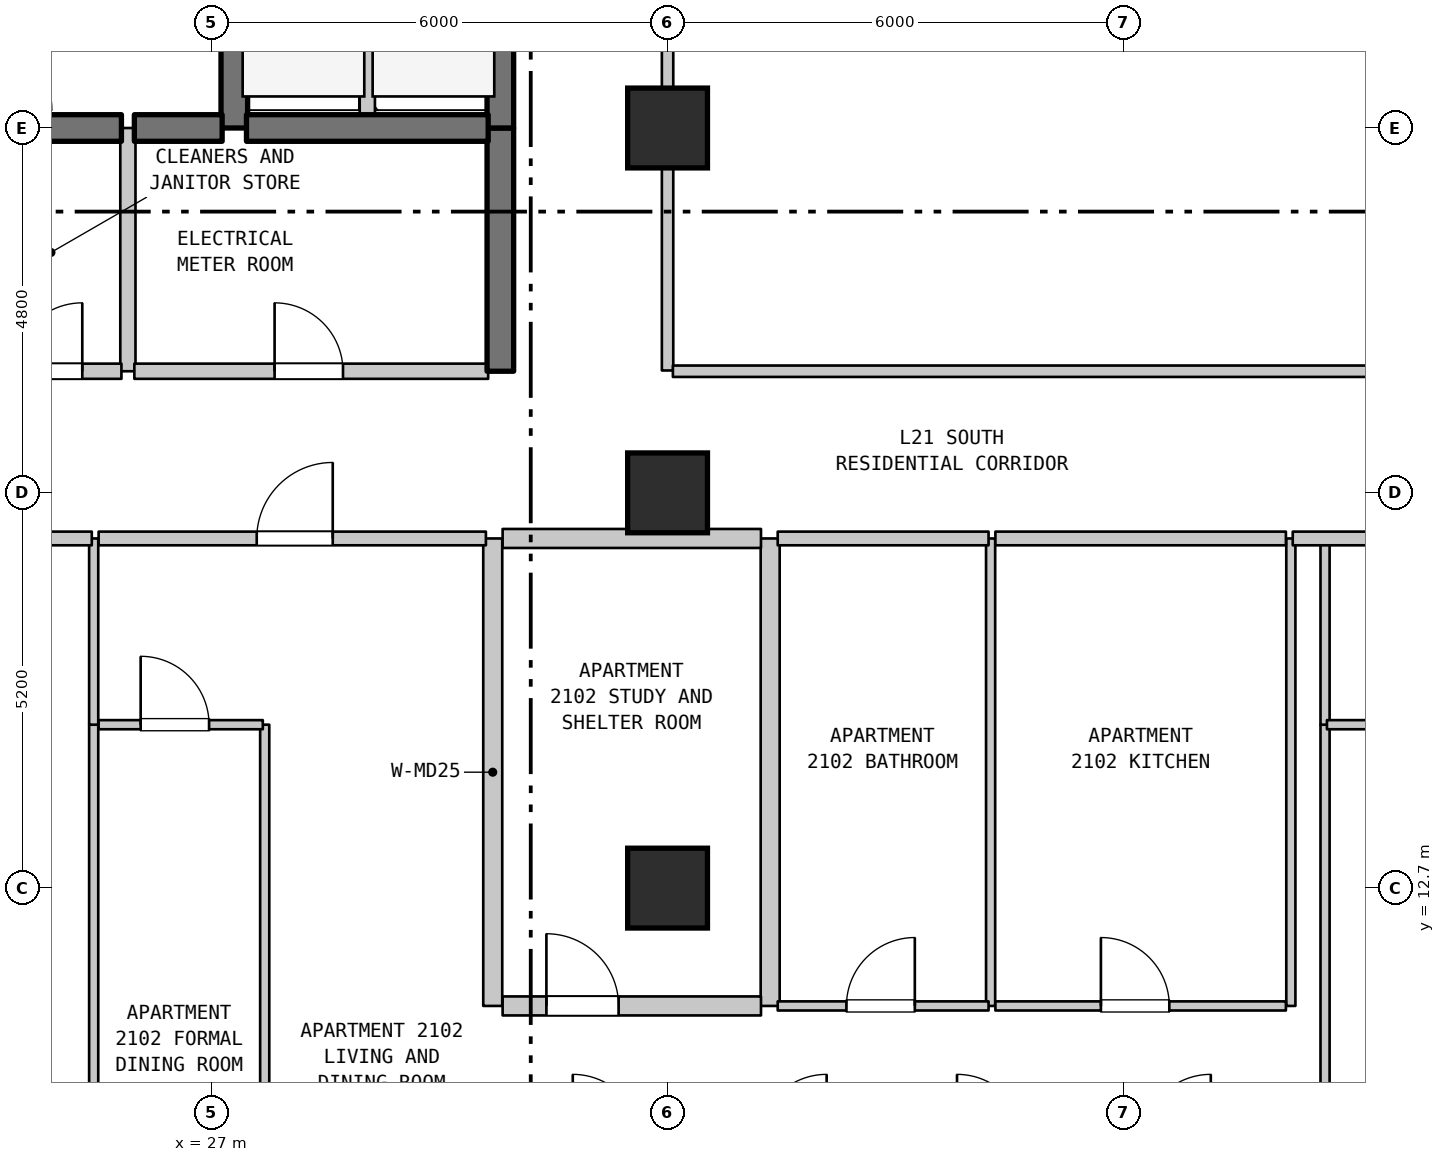
"""IFC4 building model, lengths in metres.
Left out: names, types, materials, properties, quantities, classifications, styles, units other than length and angle.
Written with IfcOpenShell. Run it as: python <this file> out.ifc"""

import sys

from ifc_helpers import new_model, si_unit, direction, frame, frame_2d, origin, origin_2d, place, context, subcontext, project, spatial, rectangle, extrude, element, fill, save


model = new_model("IFC4")
c1 = context("Model", 3, precision=1e-05, world=origin(), true_north=direction((0.0, 1.0)))
c2 = subcontext(c1, "Body", "Model", "MODEL_VIEW")
j1 = project(units=[si_unit("LENGTHUNIT", "METRE"), si_unit("PLANEANGLEUNIT", "RADIAN")], contexts=[c1])
p1 = place(None, origin())
s1 = spatial("IfcSite", under=j1, at=p1, CompositionType="ELEMENT")
p2 = place(p1, origin())
s2 = spatial("IfcBuilding", under=s1, at=p2, CompositionType="ELEMENT")
p3 = place(p2, frame((0.0, 0.0, 90.9)))
s3 = spatial("IfcBuildingStorey", under=s2, at=p3, CompositionType="ELEMENT", Elevation=90.9)
for number, where, z_axis, x_axis in (
    (1, (33.0, 12.7, 0.0), (0.0, 0.0, 1.0), (1.0, 0.0, 0.0)),
    (2, (33.0, 17.9, 0.0), (0.0, 0.0, 1.0), (1.0, 0.0, 0.0)),
    (3, (33.0, 22.7, 0.0), (0.0, 0.0, 1.0), (1.0, 0.0, 0.0)),
):
    element("IfcColumn", number, at=place(p3, frame(where, z_axis=z_axis, x_axis=x_axis)), inside=s3, PredefinedType="COLUMN", context=c2, shape_type="SweptSolid", body=[
        extrude(rectangle(XDim=1.05, YDim=1.05, at=origin_2d()), origin(), (0.0, 0.0, 1.0), 3.7),
    ])
p4 = place(p3, frame((25.45, 0.71, 0.0), z_axis=(0.0, 0.0, 1.0), x_axis=(0.0, 1.0, 0.0)))
e4 = element("IfcWall", 4, at=p4, inside=s3, PredefinedType="PARTITIONING", context=c2, shape_type="SweptSolid", body=[
    extrude(rectangle(XDim=14.14, YDim=0.12, at=frame_2d((7.07, 0.0))), origin(), (0.0, 0.0, 1.0), 3.385),
])
p5 = place(p3, frame((25.45, 14.85, 0.0), z_axis=(0.0, 0.0, 1.0), x_axis=(0.0, 1.0, 0.0)))
e5 = element("IfcWall", 5, at=p5, inside=s3, PredefinedType="PARTITIONING", context=c2, shape_type="SweptSolid", body=[
    extrude(rectangle(XDim=2.45, YDim=0.12, at=frame_2d((1.225, 0.0))), origin(), (0.0, 0.0, 1.0), 3.385),
])
p6 = place(p3, frame((25.9, 19.5, 0.0), z_axis=(0.0, 0.0, 1.0), x_axis=(0.0, 1.0, 0.0)))
e6 = element("IfcWall", 6, at=p6, inside=s3, PredefinedType="STANDARD", context=c2, shape_type="SweptSolid", body=[
    extrude(rectangle(XDim=3.2, YDim=0.2, at=frame_2d((1.6, 0.0))), origin(), (0.0, 0.0, 1.0), 3.385),
])
p7 = place(p3, frame((27.3, 22.7, 0.0), z_axis=(0.0, 0.0, 1.0), x_axis=(0.0, 1.0, 0.0)))
e7 = element("IfcWall", 7, at=p7, inside=s3, PredefinedType="SHEAR", context=c2, shape_type="SweptSolid", body=[
    extrude(rectangle(XDim=2.9, YDim=0.35, at=frame_2d((1.45, 0.0))), origin(), (0.0, 0.0, 1.0), 3.385),
])
p8 = place(p3, frame((27.7, 0.71, 0.0), z_axis=(0.0, 0.0, 1.0), x_axis=(0.0, 1.0, 0.0)))
e8 = element("IfcWall", 8, at=p8, inside=s3, PredefinedType="PARTITIONING", context=c2, shape_type="SweptSolid", body=[
    extrude(rectangle(XDim=14.14, YDim=0.12, at=frame_2d((7.07, 0.0))), origin(), (0.0, 0.0, 1.0), 3.385),
])
p9 = place(p3, frame((29.05, 22.7, 0.0), z_axis=(0.0, 0.0, 1.0), x_axis=(0.0, 1.0, 0.0)))
e9 = element("IfcWall", 9, at=p9, inside=s3, PredefinedType="STANDARD", context=c2, shape_type="SweptSolid", body=[
    extrude(rectangle(XDim=2.9, YDim=0.2, at=frame_2d((1.45, 0.0))), origin(), (0.0, 0.0, 1.0), 3.385),
])
p10 = place(p3, frame((30.7, 11.15, 0.0), z_axis=(0.0, 0.0, 1.0), x_axis=(0.0, 1.0, 0.0)))
e10 = element("IfcWall", 10, at=p10, inside=s3, PredefinedType="STANDARD", context=c2, shape_type="SweptSolid", body=[
    extrude(rectangle(XDim=6.15, YDim=0.25, at=frame_2d((3.075, 0.0))), origin(), (0.0, 0.0, 1.0), 3.385),
])
p11 = place(p3, frame((30.8, 19.5, 0.0), z_axis=(0.0, 0.0, 1.0), x_axis=(0.0, 1.0, 0.0)))
e11 = element("IfcWall", 11, at=p11, inside=s3, PredefinedType="SHEAR", context=c2, shape_type="SweptSolid", body=[
    extrude(rectangle(XDim=3.2, YDim=0.35, at=frame_2d((1.6, 0.0))), origin(), (0.0, 0.0, 1.0), 3.385),
])
p12 = place(p3, frame((30.8, 22.7, 0.0), z_axis=(0.0, 0.0, 1.0), x_axis=(0.0, 1.0, 0.0)))
e12 = element("IfcWall", 12, at=p12, inside=s3, PredefinedType="SHEAR", context=c2, shape_type="SweptSolid", body=[
    extrude(rectangle(XDim=2.9, YDim=0.35, at=frame_2d((1.45, 0.0))), origin(), (0.0, 0.0, 1.0), 3.385),
])
p13 = place(p3, frame((33.0, 19.51, 0.0), z_axis=(0.0, 0.0, 1.0), x_axis=(0.0, 1.0, 0.0)))
e13 = element("IfcWall", 13, at=p13, inside=s3, PredefinedType="STANDARD", context=c2, shape_type="SweptSolid", body=[
    extrude(rectangle(XDim=6.18, YDim=0.15, at=frame_2d((3.09, 0.0))), origin(), (0.0, 0.0, 1.0), 2.935),
])
p14 = place(p3, frame((34.35, 11.15, 0.0), z_axis=(0.0, 0.0, 1.0), x_axis=(0.0, 1.0, 0.0)))
e14 = element("IfcWall", 14, at=p14, inside=s3, PredefinedType="STANDARD", context=c2, shape_type="SweptSolid", body=[
    extrude(rectangle(XDim=6.15, YDim=0.25, at=frame_2d((3.075, 0.0))), origin(), (0.0, 0.0, 1.0), 3.385),
])
for number, where, z_axis, x_axis in (
    (15, (37.25, 11.15, 0.0), (0.0, 0.0, 1.0), (0.0, 1.0, 0.0)),
    (16, (41.2, 11.15, 0.0), (0.0, 0.0, 1.0), (0.0, 1.0, 0.0)),
):
    element("IfcWall", number, at=place(p3, frame(where, z_axis=z_axis, x_axis=x_axis)), inside=s3, PredefinedType="PARTITIONING", context=c2, shape_type="SweptSolid", body=[
        extrude(rectangle(XDim=6.15, YDim=0.12, at=frame_2d((3.075, 0.0))), origin(), (0.0, 0.0, 1.0), 3.385),
    ])
p15 = place(p3, frame((41.65, 9.35, 0.0), z_axis=(0.0, 0.0, 1.0), x_axis=(0.0, 1.0, 0.0)))
e17 = element("IfcWall", 17, at=p15, inside=s3, PredefinedType="PARTITIONING", context=c2, shape_type="SweptSolid", body=[
    extrude(rectangle(XDim=5.5, YDim=0.12, at=frame_2d((2.75, 0.0))), origin(), (0.0, 0.0, 1.0), 3.385),
])
p16 = place(p3, frame((41.65, 14.85, 0.0), z_axis=(0.0, 0.0, 1.0), x_axis=(0.0, 1.0, 0.0)))
e18 = element("IfcWall", 18, at=p16, inside=s3, PredefinedType="PARTITIONING", context=c2, shape_type="SweptSolid", body=[
    extrude(rectangle(XDim=2.45, YDim=0.12, at=frame_2d((1.225, 0.0))), origin(), (0.0, 0.0, 1.0), 3.385),
])
p17 = place(p3, frame((30.83, 11.15, 0.0), z_axis=(0.0, 0.0, 1.0), x_axis=(1.0, 0.0, 0.0)))
e19 = element("IfcWall", 19, at=p17, inside=s3, PredefinedType="STANDARD", context=c2, shape_type="SweptSolid", body=[
    extrude(rectangle(XDim=3.399, YDim=0.25, at=frame_2d((1.699, 0.0))), origin(), (0.0, 0.0, 1.0), 3.385),
])
p18 = place(p17, frame((0.576, 0.0, 0.0)))
e20 = element("IfcOpeningElement", 20, at=p18, cuts=e19, PredefinedType="OPENING", context=c2, shape_type="SweptSolid", body=[
    extrude(rectangle(XDim=0.95, YDim=2.15, at=frame_2d((0.475, 1.075))), frame((0.0, 0.135, 0.0), z_axis=(0.0, -1.0, 0.0), x_axis=(1.0, 0.0, 0.0)), (0.0, 0.0, 1.0), 0.27),
])
p19 = place(p3, frame((34.449, 11.15, 0.0), z_axis=(0.0, 0.0, 1.0), x_axis=(1.0, 0.0, 0.0)))
e21 = element("IfcWall", 21, at=p19, inside=s3, PredefinedType="PARTITIONING", context=c2, shape_type="SweptSolid", body=[
    extrude(rectangle(XDim=2.774, YDim=0.12, at=frame_2d((1.387, 0.0))), origin(), (0.0, 0.0, 1.0), 3.385),
])
p20 = place(p19, frame((0.904, 0.0, 0.0)))
e22 = element("IfcOpeningElement", 22, at=p20, cuts=e21, PredefinedType="OPENING", context=c2, shape_type="SweptSolid", body=[
    extrude(rectangle(XDim=0.9, YDim=2.1, at=frame_2d((0.45, 1.05))), frame((0.0, 0.07, 0.0), z_axis=(0.0, -1.0, 0.0), x_axis=(1.0, 0.0, 0.0)), (0.0, 0.0, 1.0), 0.14),
])
p21 = place(p3, frame((37.313, 11.15, 0.0), z_axis=(0.0, 0.0, 1.0), x_axis=(1.0, 0.0, 0.0)))
e23 = element("IfcWall", 23, at=p21, inside=s3, PredefinedType="PARTITIONING", context=c2, shape_type="SweptSolid", body=[
    extrude(rectangle(XDim=3.822, YDim=0.12, at=frame_2d((1.911, 0.0))), origin(), (0.0, 0.0, 1.0), 3.385),
])
p22 = place(p21, frame((1.388, 0.0, 0.0)))
e24 = element("IfcOpeningElement", 24, at=p22, cuts=e23, PredefinedType="OPENING", context=c2, shape_type="SweptSolid", body=[
    extrude(rectangle(XDim=0.9, YDim=2.15, at=frame_2d((0.45, 1.075))), frame((0.0, 0.07, 0.0), z_axis=(0.0, -1.0, 0.0), x_axis=(1.0, 0.0, 0.0)), (0.0, 0.0, 1.0), 0.14),
])
p23 = place(p3, frame((25.515, 14.85, 0.0), z_axis=(0.0, 0.0, 1.0), x_axis=(1.0, 0.0, 0.0)))
e25 = element("IfcWall", 25, at=p23, inside=s3, PredefinedType="PARTITIONING", context=c2, shape_type="SweptSolid", body=[
    extrude(rectangle(XDim=2.16, YDim=0.12, at=frame_2d((1.08, 0.0))), origin(), (0.0, 0.0, 1.0), 3.385),
])
p24 = place(p23, frame((0.553, 0.0, 0.0)))
e26 = element("IfcOpeningElement", 26, at=p24, cuts=e25, PredefinedType="OPENING", context=c2, shape_type="SweptSolid", body=[
    extrude(rectangle(XDim=0.9, YDim=2.15, at=frame_2d((0.45, 1.075))), frame((0.0, 0.07, 0.0), z_axis=(0.0, -1.0, 0.0), x_axis=(1.0, 0.0, 0.0)), (0.0, 0.0, 1.0), 0.14),
])
p25 = place(p3, frame((41.675, 14.85, 0.0), z_axis=(0.0, 0.0, 1.0), x_axis=(1.0, 0.0, 0.0)))
e27 = element("IfcWall", 27, at=p25, inside=s3, PredefinedType="PARTITIONING", context=c2, shape_type="SweptSolid", body=[
    extrude(rectangle(XDim=2.16, YDim=0.12, at=frame_2d((1.08, 0.0))), origin(), (0.0, 0.0, 1.0), 3.385),
])
p26 = place(p25, frame((0.553, 0.0, 0.0)))
e28 = element("IfcOpeningElement", 28, at=p26, cuts=e27, PredefinedType="OPENING", context=c2, shape_type="SweptSolid", body=[
    extrude(rectangle(XDim=0.9, YDim=2.15, at=frame_2d((0.45, 1.075))), frame((0.0, 0.07, 0.0), z_axis=(0.0, -1.0, 0.0), x_axis=(1.0, 0.0, 0.0)), (0.0, 0.0, 1.0), 0.14),
])
p27 = place(p3, frame((23.015, 17.3, 0.0), z_axis=(0.0, 0.0, 1.0), x_axis=(1.0, 0.0, 0.0)))
e29 = element("IfcWall", 29, at=p27, inside=s3, PredefinedType="STANDARD", context=c2, shape_type="SweptSolid", body=[
    extrude(rectangle(XDim=2.41, YDim=0.18, at=frame_2d((1.205, 0.0))), origin(), (0.0, 0.0, 1.0), 3.385),
])
p28 = place(p3, frame((25.515, 17.3, 0.0), z_axis=(0.0, 0.0, 1.0), x_axis=(1.0, 0.0, 0.0)))
e30 = element("IfcWall", 30, at=p28, inside=s3, PredefinedType="STANDARD", context=c2, shape_type="SweptSolid", body=[
    extrude(rectangle(XDim=5.095, YDim=0.18, at=frame_2d((2.548, 0.0))), origin(), (0.0, 0.0, 1.0), 3.385),
])
p29 = place(p28, frame((2.08, 0.0, 0.0)))
e31 = element("IfcOpeningElement", 31, at=p29, cuts=e30, PredefinedType="OPENING", context=c2, shape_type="SweptSolid", body=[
    extrude(rectangle(XDim=1.0, YDim=2.15, at=frame_2d((0.5, 1.075))), frame((0.0, 0.1, 0.0), z_axis=(0.0, -1.0, 0.0), x_axis=(1.0, 0.0, 0.0)), (0.0, 0.0, 1.0), 0.2),
])
p30 = place(p3, frame((30.83, 17.3, 0.0), z_axis=(0.0, 0.0, 1.0), x_axis=(1.0, 0.0, 0.0)))
e32 = element("IfcWall", 32, at=p30, inside=s3, PredefinedType="STANDARD", context=c2, shape_type="SweptSolid", body=[
    extrude(rectangle(XDim=3.399, YDim=0.25, at=frame_2d((1.699, 0.0))), origin(), (0.0, 0.0, 1.0), 3.385),
])
p31 = place(p3, frame((34.449, 17.3, 0.0), z_axis=(0.0, 0.0, 1.0), x_axis=(1.0, 0.0, 0.0)))
e33 = element("IfcWall", 33, at=p31, inside=s3, PredefinedType="STANDARD", context=c2, shape_type="SweptSolid", body=[
    extrude(rectangle(XDim=2.774, YDim=0.18, at=frame_2d((1.387, 0.0))), origin(), (0.0, 0.0, 1.0), 3.385),
])
p32 = place(p3, frame((37.313, 17.3, 0.0), z_axis=(0.0, 0.0, 1.0), x_axis=(1.0, 0.0, 0.0)))
e34 = element("IfcWall", 34, at=p32, inside=s3, PredefinedType="STANDARD", context=c2, shape_type="SweptSolid", body=[
    extrude(rectangle(XDim=3.822, YDim=0.18, at=frame_2d((1.911, 0.0))), origin(), (0.0, 0.0, 1.0), 3.385),
])
p33 = place(p3, frame((41.225, 17.3, 0.0), z_axis=(0.0, 0.0, 1.0), x_axis=(1.0, 0.0, 0.0)))
e35 = element("IfcWall", 35, at=p33, inside=s3, PredefinedType="STANDARD", context=c2, shape_type="SweptSolid", body=[
    extrude(rectangle(XDim=5.545, YDim=0.18, at=frame_2d((2.772, 0.0))), origin(), (0.0, 0.0, 1.0), 3.385),
])
p34 = place(p33, frame((2.435, 0.0, 0.0)))
e36 = element("IfcOpeningElement", 36, at=p34, cuts=e35, PredefinedType="OPENING", context=c2, shape_type="SweptSolid", body=[
    extrude(rectangle(XDim=1.0, YDim=2.15, at=frame_2d((0.5, 1.075))), frame((0.0, 0.1, 0.0), z_axis=(0.0, -1.0, 0.0), x_axis=(1.0, 0.0, 0.0)), (0.0, 0.0, 1.0), 0.2),
])
p35 = place(p3, frame((23.96, 19.5, 0.0), z_axis=(0.0, 0.0, 1.0), x_axis=(1.0, 0.0, 0.0)))
e37 = element("IfcWall", 37, at=p35, inside=s3, PredefinedType="STANDARD", context=c2, shape_type="SweptSolid", body=[
    extrude(rectangle(XDim=1.855, YDim=0.2, at=frame_2d((0.927, 0.0))), origin(), (0.0, 0.0, 1.0), 3.385),
])
p36 = place(p35, frame((0.44, 0.0, 0.0)))
e38 = element("IfcOpeningElement", 38, at=p36, cuts=e37, PredefinedType="OPENING", context=c2, shape_type="SweptSolid", body=[
    extrude(rectangle(XDim=0.9, YDim=2.15, at=frame_2d((0.45, 1.075))), frame((0.0, 0.11, 0.0), z_axis=(0.0, -1.0, 0.0), x_axis=(1.0, 0.0, 0.0)), (0.0, 0.0, 1.0), 0.22),
])
p37 = place(p3, frame((25.985, 19.5, 0.0), z_axis=(0.0, 0.0, 1.0), x_axis=(1.0, 0.0, 0.0)))
e39 = element("IfcWall", 39, at=p37, inside=s3, PredefinedType="STANDARD", context=c2, shape_type="SweptSolid", body=[
    extrude(rectangle(XDim=4.655, YDim=0.2, at=frame_2d((2.327, 0.0))), origin(), (0.0, 0.0, 1.0), 3.385),
])
p38 = place(p37, frame((1.845, 0.0, 0.0)))
e40 = element("IfcOpeningElement", 40, at=p38, cuts=e39, PredefinedType="OPENING", context=c2, shape_type="SweptSolid", body=[
    extrude(rectangle(XDim=0.9, YDim=2.15, at=frame_2d((0.45, 1.075))), frame((0.0, 0.11, 0.0), z_axis=(0.0, -1.0, 0.0), x_axis=(1.0, 0.0, 0.0)), (0.0, 0.0, 1.0), 0.22),
])
p39 = place(p3, frame((33.07, 19.5, 0.0), z_axis=(0.0, 0.0, 1.0), x_axis=(1.0, 0.0, 0.0)))
e41 = element("IfcWall", 41, at=p39, inside=s3, PredefinedType="STANDARD", context=c2, shape_type="SweptSolid", body=[
    extrude(rectangle(XDim=21.51, YDim=0.15, at=frame_2d((10.755, 0.0))), origin(), (0.0, 0.0, 1.0), 3.385),
])
p40 = place(p3, frame((23.96, 22.7, 0.0), z_axis=(0.0, 0.0, 1.0), x_axis=(1.0, 0.0, 0.0)))
e42 = element("IfcWall", 42, at=p40, inside=s3, PredefinedType="SHEAR", context=c2, shape_type="SweptSolid", body=[
    extrude(rectangle(XDim=1.855, YDim=0.35, at=frame_2d((0.927, 0.0))), origin(), (0.0, 0.0, 1.0), 3.385),
])
p41 = place(p3, frame((25.985, 22.7, 0.0), z_axis=(0.0, 0.0, 1.0), x_axis=(1.0, 0.0, 0.0)))
e43 = element("IfcWall", 43, at=p41, inside=s3, PredefinedType="SHEAR", context=c2, shape_type="SweptSolid", body=[
    extrude(rectangle(XDim=1.155, YDim=0.35, at=frame_2d((0.577, 0.0))), origin(), (0.0, 0.0, 1.0), 3.385),
])
p42 = place(p3, frame((27.46, 22.7, 0.0), z_axis=(0.0, 0.0, 1.0), x_axis=(1.0, 0.0, 0.0)))
e44 = element("IfcWall", 44, at=p42, inside=s3, PredefinedType="SHEAR", context=c2, shape_type="SweptSolid", body=[
    extrude(rectangle(XDim=3.18, YDim=0.35, at=frame_2d((1.59, 0.0))), origin(), (0.0, 0.0, 1.0), 3.385),
])
p43 = place(p18, origin())
e45 = element("IfcDoor", 45, at=p43, inside=s3, OperationType="SINGLE_SWING_LEFT", PredefinedType="DOOR", context=c2, shape_type="SweptSolid", body=[
    extrude(rectangle(XDim=0.95, YDim=2.15, at=frame_2d((0.475, 1.075))), frame((0.0, 0.025, 0.0), z_axis=(0.0, -1.0, 0.0), x_axis=(1.0, 0.0, 0.0)), (0.0, 0.0, 1.0), 0.05),
])
fill(e20, e45)
p44 = place(p20, origin())
e46 = element("IfcDoor", 46, at=p44, inside=s3, OperationType="SINGLE_SWING_RIGHT", PredefinedType="DOOR", context=c2, shape_type="SweptSolid", body=[
    extrude(rectangle(XDim=0.9, YDim=2.1, at=frame_2d((0.45, 1.05))), frame((0.0, 0.025, 0.0), z_axis=(0.0, -1.0, 0.0), x_axis=(1.0, 0.0, 0.0)), (0.0, 0.0, 1.0), 0.05),
])
fill(e22, e46)
p45 = place(p22, origin())
e47 = element("IfcDoor", 47, at=p45, inside=s3, OperationType="SINGLE_SWING_LEFT", PredefinedType="DOOR", context=c2, shape_type="SweptSolid", body=[
    extrude(rectangle(XDim=0.9, YDim=2.15, at=frame_2d((0.45, 1.075))), frame((0.0, 0.025, 0.0), z_axis=(0.0, -1.0, 0.0), x_axis=(1.0, 0.0, 0.0)), (0.0, 0.0, 1.0), 0.05),
])
fill(e24, e47)
p46 = place(p24, origin())
e48 = element("IfcDoor", 48, at=p46, inside=s3, OperationType="SINGLE_SWING_LEFT", PredefinedType="DOOR", context=c2, shape_type="SweptSolid", body=[
    extrude(rectangle(XDim=0.9, YDim=2.15, at=frame_2d((0.45, 1.075))), frame((0.0, 0.025, 0.0), z_axis=(0.0, -1.0, 0.0), x_axis=(1.0, 0.0, 0.0)), (0.0, 0.0, 1.0), 0.05),
])
fill(e26, e48)
p47 = place(p29, origin())
e49 = element("IfcDoor", 49, at=p47, inside=s3, OperationType="SINGLE_SWING_RIGHT", PredefinedType="DOOR", context=c2, shape_type="SweptSolid", body=[
    extrude(rectangle(XDim=1.0, YDim=2.15, at=frame_2d((0.5, 1.075))), frame((0.0, 0.025, 0.0), z_axis=(0.0, -1.0, 0.0), x_axis=(1.0, 0.0, 0.0)), (0.0, 0.0, 1.0), 0.05),
])
fill(e31, e49)
p48 = place(p36, origin())
e50 = element("IfcDoor", 50, at=p48, inside=s3, OperationType="SINGLE_SWING_RIGHT", PredefinedType="DOOR", context=c2, shape_type="SweptSolid", body=[
    extrude(rectangle(XDim=0.9, YDim=2.15, at=frame_2d((0.45, 1.075))), frame((0.0, 0.025, 0.0), z_axis=(0.0, -1.0, 0.0), x_axis=(1.0, 0.0, 0.0)), (0.0, 0.0, 1.0), 0.05),
])
fill(e38, e50)
p49 = place(p38, origin())
e51 = element("IfcDoor", 51, at=p49, inside=s3, OperationType="SINGLE_SWING_LEFT", PredefinedType="DOOR", context=c2, shape_type="SweptSolid", body=[
    extrude(rectangle(XDim=0.9, YDim=2.15, at=frame_2d((0.45, 1.075))), frame((0.0, 0.025, 0.0), z_axis=(0.0, -1.0, 0.0), x_axis=(1.0, 0.0, 0.0)), (0.0, 0.0, 1.0), 0.05),
])
fill(e40, e51)
save(model, sys.argv[1])
